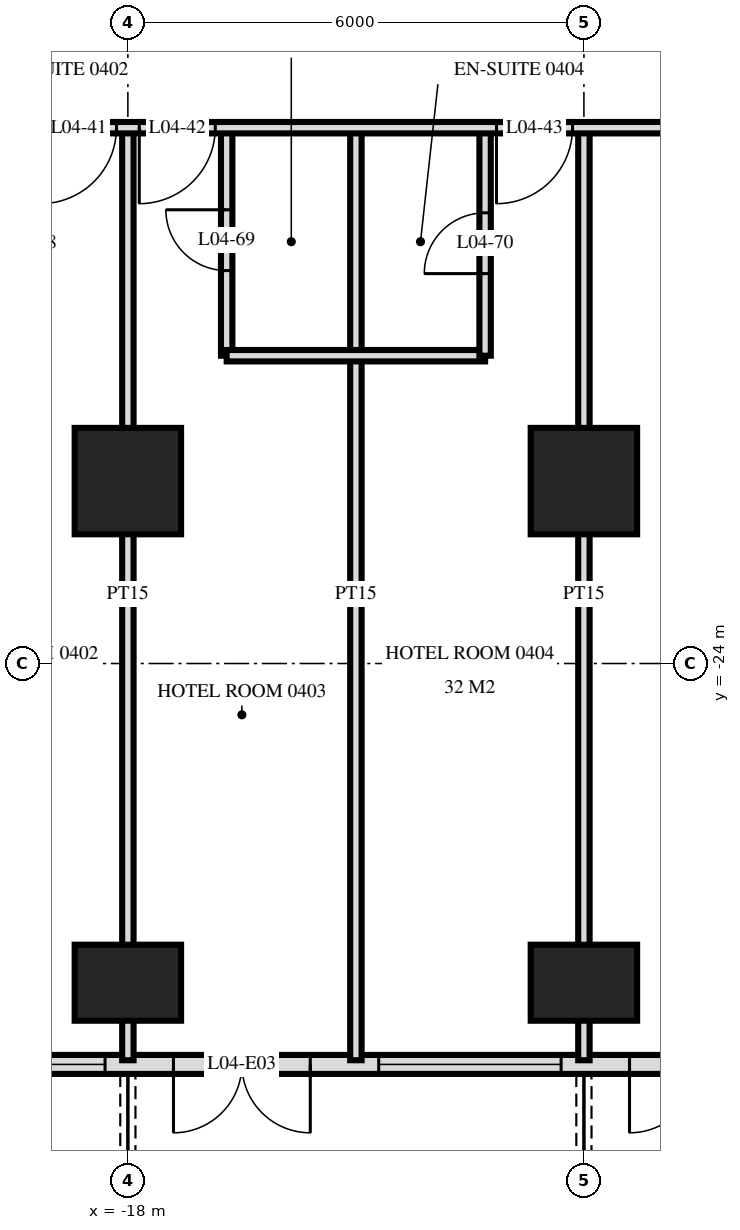
"""IFC4 building model, lengths in metres.
Left out: names, types, materials, properties, quantities, classifications, styles, units other than length and angle.
Written with IfcOpenShell. Run it as: python <this file> out.ifc"""

import sys

from ifc_helpers import new_model, si_unit, direction, frame, frame_2d, origin, origin_2d, place, context, subcontext, project, spatial, rectangle, extrude, element, fill, save


model = new_model("IFC4")
c1 = context("Model", 3, precision=1e-05, world=origin(), true_north=direction((0.0, 1.0)))
c2 = subcontext(c1, "Body", "Model", "MODEL_VIEW")
j1 = project(units=[si_unit("LENGTHUNIT", "METRE"), si_unit("PLANEANGLEUNIT", "RADIAN")], contexts=[c1])
p1 = place(None, origin())
s1 = spatial("IfcSite", under=j1, at=p1, CompositionType="ELEMENT")
p2 = place(p1, origin())
s2 = spatial("IfcBuilding", under=s1, at=p2, CompositionType="ELEMENT")
p3 = place(p2, frame((0.0, 0.0, 24.0)))
s3 = spatial("IfcBuildingStorey", under=s2, at=p3, CompositionType="ELEMENT", Elevation=24.0)
p4 = place(p3, frame((-18.0, -28.2, -0.28), z_axis=(0.0, 0.0, 1.0), x_axis=(1.0, 0.0, 0.0)))
e1 = element("IfcColumn", 1, at=p4, inside=s3, PredefinedType="COLUMN", context=c2, shape_type="SweptSolid", body=[
    extrude(rectangle(XDim=1.4, YDim=1.0, at=origin_2d()), origin(), (0.0, 0.0, 1.0), 3.88),
])
p5 = place(p3, frame((-18.0, -21.6, -0.28), z_axis=(0.0, 0.0, 1.0), x_axis=(1.0, 0.0, 0.0)))
e2 = element("IfcColumn", 2, at=p5, inside=s3, PredefinedType="COLUMN", context=c2, shape_type="SweptSolid", body=[
    extrude(rectangle(XDim=1.4, YDim=1.4, at=origin_2d()), origin(), (0.0, 0.0, 1.0), 3.88),
])
p6 = place(p3, frame((-12.0, -28.2, -0.28), z_axis=(0.0, 0.0, 1.0), x_axis=(1.0, 0.0, 0.0)))
e3 = element("IfcColumn", 3, at=p6, inside=s3, PredefinedType="COLUMN", context=c2, shape_type="SweptSolid", body=[
    extrude(rectangle(XDim=1.4, YDim=1.0, at=origin_2d()), origin(), (0.0, 0.0, 1.0), 3.88),
])
p7 = place(p3, frame((-12.0, -21.6, -0.28), z_axis=(0.0, 0.0, 1.0), x_axis=(1.0, 0.0, 0.0)))
e4 = element("IfcColumn", 4, at=p7, inside=s3, PredefinedType="COLUMN", context=c2, shape_type="SweptSolid", body=[
    extrude(rectangle(XDim=1.4, YDim=1.4, at=origin_2d()), origin(), (0.0, 0.0, 1.0), 3.88),
])
p8 = place(p3, frame((-28.775, -29.275, 0.0), z_axis=(0.0, 0.0, 1.0), x_axis=(1.0, 0.0, 0.0)))
e5 = element("IfcWall", 5, at=p8, inside=s3, PredefinedType="SOLIDWALL", context=c2, shape_type="SweptSolid", body=[
    extrude(rectangle(XDim=57.551, YDim=0.25, at=frame_2d((28.775, 0.0))), origin(), (0.0, 0.0, 1.0), 3.32),
])
p9 = place(p8, frame((0.575, 0.0, 0.0)))
e6 = element("IfcOpeningElement", 6, at=p9, cuts=e5, PredefinedType="OPENING", context=c2, shape_type="SweptSolid", body=[
    extrude(rectangle(XDim=1.8, YDim=2.4, at=frame_2d((0.9, 1.2))), frame((0.0, 0.135, 0.0), z_axis=(0.0, -1.0, 0.0), x_axis=(1.0, 0.0, 0.0)), (0.0, 0.0, 1.0), 0.27),
])
p10 = place(p8, frame((5.375, 0.0, 0.0)))
e7 = element("IfcOpeningElement", 7, at=p10, cuts=e5, PredefinedType="OPENING", context=c2, shape_type="SweptSolid", body=[
    extrude(rectangle(XDim=1.8, YDim=2.4, at=frame_2d((0.9, 1.2))), frame((0.0, 0.135, 0.0), z_axis=(0.0, -1.0, 0.0), x_axis=(1.0, 0.0, 0.0)), (0.0, 0.0, 1.0), 0.27),
])
p11 = place(p8, frame((8.075, 0.0, 0.3)))
e8 = element("IfcOpeningElement", 8, at=p11, cuts=e5, PredefinedType="OPENING", context=c2, shape_type="SweptSolid", body=[
    extrude(rectangle(XDim=2.4, YDim=2.1, at=frame_2d((1.2, 1.05))), frame((0.0, 0.135, 0.0), z_axis=(0.0, -1.0, 0.0), x_axis=(1.0, 0.0, 0.0)), (0.0, 0.0, 1.0), 0.27),
])
p12 = place(p8, frame((11.375, 0.0, 0.0)))
e9 = element("IfcOpeningElement", 9, at=p12, cuts=e5, PredefinedType="OPENING", context=c2, shape_type="SweptSolid", body=[
    extrude(rectangle(XDim=1.8, YDim=2.4, at=frame_2d((0.9, 1.2))), frame((0.0, 0.135, 0.0), z_axis=(0.0, -1.0, 0.0), x_axis=(1.0, 0.0, 0.0)), (0.0, 0.0, 1.0), 0.27),
])
p13 = place(p8, frame((14.075, 0.0, 0.3)))
e10 = element("IfcOpeningElement", 10, at=p13, cuts=e5, PredefinedType="OPENING", context=c2, shape_type="SweptSolid", body=[
    extrude(rectangle(XDim=2.4, YDim=2.1, at=frame_2d((1.2, 1.05))), frame((0.0, 0.135, 0.0), z_axis=(0.0, -1.0, 0.0), x_axis=(1.0, 0.0, 0.0)), (0.0, 0.0, 1.0), 0.27),
])
p14 = place(p8, frame((17.375, 0.0, 0.0)))
e11 = element("IfcOpeningElement", 11, at=p14, cuts=e5, PredefinedType="OPENING", context=c2, shape_type="SweptSolid", body=[
    extrude(rectangle(XDim=1.8, YDim=2.4, at=frame_2d((0.9, 1.2))), frame((0.0, 0.135, 0.0), z_axis=(0.0, -1.0, 0.0), x_axis=(1.0, 0.0, 0.0)), (0.0, 0.0, 1.0), 0.27),
])
p15 = place(p8, frame((20.075, 0.0, 0.3)))
e12 = element("IfcOpeningElement", 12, at=p15, cuts=e5, PredefinedType="OPENING", context=c2, shape_type="SweptSolid", body=[
    extrude(rectangle(XDim=2.4, YDim=2.1, at=frame_2d((1.2, 1.05))), frame((0.0, 0.135, 0.0), z_axis=(0.0, -1.0, 0.0), x_axis=(1.0, 0.0, 0.0)), (0.0, 0.0, 1.0), 0.27),
])
p16 = place(p8, frame((23.075, 0.0, 0.3)))
e13 = element("IfcOpeningElement", 13, at=p16, cuts=e5, PredefinedType="OPENING", context=c2, shape_type="SweptSolid", body=[
    extrude(rectangle(XDim=2.4, YDim=2.1, at=frame_2d((1.2, 1.05))), frame((0.0, 0.135, 0.0), z_axis=(0.0, -1.0, 0.0), x_axis=(1.0, 0.0, 0.0)), (0.0, 0.0, 1.0), 0.27),
])
p17 = place(p8, frame((26.375, 0.0, 0.0)))
e14 = element("IfcOpeningElement", 14, at=p17, cuts=e5, PredefinedType="OPENING", context=c2, shape_type="SweptSolid", body=[
    extrude(rectangle(XDim=1.8, YDim=2.4, at=frame_2d((0.9, 1.2))), frame((0.0, 0.135, 0.0), z_axis=(0.0, -1.0, 0.0), x_axis=(1.0, 0.0, 0.0)), (0.0, 0.0, 1.0), 0.27),
])
p18 = place(p8, frame((29.375, 0.0, 0.0)))
e15 = element("IfcOpeningElement", 15, at=p18, cuts=e5, PredefinedType="OPENING", context=c2, shape_type="SweptSolid", body=[
    extrude(rectangle(XDim=1.8, YDim=2.4, at=frame_2d((0.9, 1.2))), frame((0.0, 0.135, 0.0), z_axis=(0.0, -1.0, 0.0), x_axis=(1.0, 0.0, 0.0)), (0.0, 0.0, 1.0), 0.27),
])
p19 = place(p8, frame((32.075, 0.0, 0.3)))
e16 = element("IfcOpeningElement", 16, at=p19, cuts=e5, PredefinedType="OPENING", context=c2, shape_type="SweptSolid", body=[
    extrude(rectangle(XDim=2.4, YDim=2.1, at=frame_2d((1.2, 1.05))), frame((0.0, 0.135, 0.0), z_axis=(0.0, -1.0, 0.0), x_axis=(1.0, 0.0, 0.0)), (0.0, 0.0, 1.0), 0.27),
])
p20 = place(p8, frame((35.375, 0.0, 0.0)))
e17 = element("IfcOpeningElement", 17, at=p20, cuts=e5, PredefinedType="OPENING", context=c2, shape_type="SweptSolid", body=[
    extrude(rectangle(XDim=1.8, YDim=2.4, at=frame_2d((0.9, 1.2))), frame((0.0, 0.135, 0.0), z_axis=(0.0, -1.0, 0.0), x_axis=(1.0, 0.0, 0.0)), (0.0, 0.0, 1.0), 0.27),
])
p21 = place(p8, frame((38.075, 0.0, 0.3)))
e18 = element("IfcOpeningElement", 18, at=p21, cuts=e5, PredefinedType="OPENING", context=c2, shape_type="SweptSolid", body=[
    extrude(rectangle(XDim=2.4, YDim=2.1, at=frame_2d((1.2, 1.05))), frame((0.0, 0.135, 0.0), z_axis=(0.0, -1.0, 0.0), x_axis=(1.0, 0.0, 0.0)), (0.0, 0.0, 1.0), 0.27),
])
p22 = place(p8, frame((41.375, 0.0, 0.0)))
e19 = element("IfcOpeningElement", 19, at=p22, cuts=e5, PredefinedType="OPENING", context=c2, shape_type="SweptSolid", body=[
    extrude(rectangle(XDim=1.8, YDim=2.4, at=frame_2d((0.9, 1.2))), frame((0.0, 0.135, 0.0), z_axis=(0.0, -1.0, 0.0), x_axis=(1.0, 0.0, 0.0)), (0.0, 0.0, 1.0), 0.27),
])
p23 = place(p8, frame((44.075, 0.0, 0.3)))
e20 = element("IfcOpeningElement", 20, at=p23, cuts=e5, PredefinedType="OPENING", context=c2, shape_type="SweptSolid", body=[
    extrude(rectangle(XDim=2.4, YDim=2.1, at=frame_2d((1.2, 1.05))), frame((0.0, 0.135, 0.0), z_axis=(0.0, -1.0, 0.0), x_axis=(1.0, 0.0, 0.0)), (0.0, 0.0, 1.0), 0.27),
])
p24 = place(p8, frame((47.075, 0.0, 0.3)))
e21 = element("IfcOpeningElement", 21, at=p24, cuts=e5, PredefinedType="OPENING", context=c2, shape_type="SweptSolid", body=[
    extrude(rectangle(XDim=2.4, YDim=2.1, at=frame_2d((1.2, 1.05))), frame((0.0, 0.135, 0.0), z_axis=(0.0, -1.0, 0.0), x_axis=(1.0, 0.0, 0.0)), (0.0, 0.0, 1.0), 0.27),
])
p25 = place(p8, frame((50.375, 0.0, 0.0)))
e22 = element("IfcOpeningElement", 22, at=p25, cuts=e5, PredefinedType="OPENING", context=c2, shape_type="SweptSolid", body=[
    extrude(rectangle(XDim=1.8, YDim=2.4, at=frame_2d((0.9, 1.2))), frame((0.0, 0.135, 0.0), z_axis=(0.0, -1.0, 0.0), x_axis=(1.0, 0.0, 0.0)), (0.0, 0.0, 1.0), 0.27),
])
p26 = place(p8, frame((53.375, 0.0, 0.0)))
e23 = element("IfcOpeningElement", 23, at=p26, cuts=e5, PredefinedType="OPENING", context=c2, shape_type="SweptSolid", body=[
    extrude(rectangle(XDim=1.8, YDim=2.4, at=frame_2d((0.9, 1.2))), frame((0.0, 0.135, 0.0), z_axis=(0.0, -1.0, 0.0), x_axis=(1.0, 0.0, 0.0)), (0.0, 0.0, 1.0), 0.27),
])
p27 = place(p3, frame((-12.0, -29.22, 0.0), z_axis=(0.0, 0.0, 1.0), x_axis=(0.0, 1.0, 0.0)))
e24 = element("IfcWall", 24, at=p27, inside=s3, PredefinedType="PARTITIONING", context=c2, shape_type="SweptSolid", body=[
    extrude(rectangle(XDim=12.27, YDim=0.15, at=frame_2d((6.135, 0.0))), origin(), (0.0, 0.0, 1.0), 3.32),
])
p28 = place(p3, frame((-13.3, -19.95, 0.0), z_axis=(0.0, 0.0, 1.0), x_axis=(0.0, 1.0, 0.0)))
e25 = element("IfcWall", 25, at=p28, inside=s3, PredefinedType="PARTITIONING", context=c2, shape_type="SweptSolid", body=[
    extrude(rectangle(XDim=3.0, YDim=0.15, at=frame_2d((1.5, 0.0))), origin(), (0.0, 0.0, 1.0), 3.32),
])
p29 = place(p28, frame((1.08, 0.0, 0.0)))
e26 = element("IfcOpeningElement", 26, at=p29, cuts=e25, PredefinedType="OPENING", context=c2, shape_type="SweptSolid", body=[
    extrude(rectangle(XDim=0.8, YDim=2.1, at=frame_2d((0.4, 1.05))), frame((0.0, 0.085, 0.0), z_axis=(0.0, -1.0, 0.0), x_axis=(1.0, 0.0, 0.0)), (0.0, 0.0, 1.0), 0.17),
])
p30 = place(p3, frame((-15.0, -29.22, 0.0), z_axis=(0.0, 0.0, 1.0), x_axis=(0.0, 1.0, 0.0)))
e27 = element("IfcWall", 27, at=p30, inside=s3, PredefinedType="PARTITIONING", context=c2, shape_type="SweptSolid", body=[
    extrude(rectangle(XDim=12.27, YDim=0.15, at=frame_2d((6.135, 0.0))), origin(), (0.0, 0.0, 1.0), 3.32),
])
p31 = place(p3, frame((-16.7, -19.95, 0.0), z_axis=(0.0, 0.0, 1.0), x_axis=(0.0, 1.0, 0.0)))
e28 = element("IfcWall", 28, at=p31, inside=s3, PredefinedType="PARTITIONING", context=c2, shape_type="SweptSolid", body=[
    extrude(rectangle(XDim=3.0, YDim=0.15, at=frame_2d((1.5, 0.0))), origin(), (0.0, 0.0, 1.0), 3.32),
])
p32 = place(p31, frame((1.12, 0.0, 0.0)))
e29 = element("IfcOpeningElement", 29, at=p32, cuts=e28, PredefinedType="OPENING", context=c2, shape_type="SweptSolid", body=[
    extrude(rectangle(XDim=0.8, YDim=2.1, at=frame_2d((0.4, 1.05))), frame((0.0, 0.085, 0.0), z_axis=(0.0, -1.0, 0.0), x_axis=(1.0, 0.0, 0.0)), (0.0, 0.0, 1.0), 0.17),
])
p33 = place(p3, frame((-18.0, -29.22, 0.0), z_axis=(0.0, 0.0, 1.0), x_axis=(0.0, 1.0, 0.0)))
e30 = element("IfcWall", 30, at=p33, inside=s3, PredefinedType="PARTITIONING", context=c2, shape_type="SweptSolid", body=[
    extrude(rectangle(XDim=12.27, YDim=0.15, at=frame_2d((6.135, 0.0))), origin(), (0.0, 0.0, 1.0), 3.32),
])
p34 = place(p3, frame((-16.7, -19.95, 0.0), z_axis=(0.0, 0.0, 1.0), x_axis=(1.0, 0.0, 0.0)))
e31 = element("IfcWall", 31, at=p34, inside=s3, PredefinedType="PARTITIONING", context=c2, shape_type="SweptSolid", body=[
    extrude(rectangle(XDim=3.4, YDim=0.15, at=frame_2d((1.7, 0.0))), origin(), (0.0, 0.0, 1.0), 3.32),
])
p35 = place(p3, frame((-33.12, -16.95, 0.0), z_axis=(0.0, 0.0, 1.0), x_axis=(1.0, 0.0, 0.0)))
e32 = element("IfcWall", 32, at=p35, inside=s3, PredefinedType="PARTITIONING", context=c2, shape_type="SweptSolid", body=[
    extrude(rectangle(XDim=66.24, YDim=0.15, at=frame_2d((33.12, 0.0))), origin(), (0.0, 0.0, 1.0), 3.32),
])
p36 = place(p35, frame((9.27, 0.0, 0.0)))
e33 = element("IfcOpeningElement", 33, at=p36, cuts=e32, PredefinedType="OPENING", context=c2, shape_type="SweptSolid", body=[
    extrude(rectangle(XDim=1.0, YDim=2.1, at=frame_2d((0.5, 1.05))), frame((0.0, 0.085, 0.0), z_axis=(0.0, -1.0, 0.0), x_axis=(1.0, 0.0, 0.0)), (0.0, 0.0, 1.0), 0.17),
])
p37 = place(p35, frame((13.97, 0.0, 0.0)))
e34 = element("IfcOpeningElement", 34, at=p37, cuts=e32, PredefinedType="OPENING", context=c2, shape_type="SweptSolid", body=[
    extrude(rectangle(XDim=1.0, YDim=2.1, at=frame_2d((0.5, 1.05))), frame((0.0, 0.085, 0.0), z_axis=(0.0, -1.0, 0.0), x_axis=(1.0, 0.0, 0.0)), (0.0, 0.0, 1.0), 0.17),
])
p38 = place(p35, frame((15.27, 0.0, 0.0)))
e35 = element("IfcOpeningElement", 35, at=p38, cuts=e32, PredefinedType="OPENING", context=c2, shape_type="SweptSolid", body=[
    extrude(rectangle(XDim=1.0, YDim=2.1, at=frame_2d((0.5, 1.05))), frame((0.0, 0.085, 0.0), z_axis=(0.0, -1.0, 0.0), x_axis=(1.0, 0.0, 0.0)), (0.0, 0.0, 1.0), 0.17),
])
p39 = place(p35, frame((19.97, 0.0, 0.0)))
e36 = element("IfcOpeningElement", 36, at=p39, cuts=e32, PredefinedType="OPENING", context=c2, shape_type="SweptSolid", body=[
    extrude(rectangle(XDim=1.0, YDim=2.1, at=frame_2d((0.5, 1.05))), frame((0.0, 0.085, 0.0), z_axis=(0.0, -1.0, 0.0), x_axis=(1.0, 0.0, 0.0)), (0.0, 0.0, 1.0), 0.17),
])
p40 = place(p35, frame((22.27, 0.0, 0.0)))
e37 = element("IfcOpeningElement", 37, at=p40, cuts=e32, PredefinedType="OPENING", context=c2, shape_type="SweptSolid", body=[
    extrude(rectangle(XDim=1.0, YDim=2.1, at=frame_2d((0.5, 1.05))), frame((0.0, 0.085, 0.0), z_axis=(0.0, -1.0, 0.0), x_axis=(1.0, 0.0, 0.0)), (0.0, 0.0, 1.0), 0.17),
])
p41 = place(p35, frame((28.97, 0.0, 0.0)))
e38 = element("IfcOpeningElement", 38, at=p41, cuts=e32, PredefinedType="OPENING", context=c2, shape_type="SweptSolid", body=[
    extrude(rectangle(XDim=1.0, YDim=2.1, at=frame_2d((0.5, 1.05))), frame((0.0, 0.085, 0.0), z_axis=(0.0, -1.0, 0.0), x_axis=(1.0, 0.0, 0.0)), (0.0, 0.0, 1.0), 0.17),
])
p42 = place(p35, frame((30.27, 0.0, 0.0)))
e39 = element("IfcOpeningElement", 39, at=p42, cuts=e32, PredefinedType="OPENING", context=c2, shape_type="SweptSolid", body=[
    extrude(rectangle(XDim=1.0, YDim=2.1, at=frame_2d((0.5, 1.05))), frame((0.0, 0.085, 0.0), z_axis=(0.0, -1.0, 0.0), x_axis=(1.0, 0.0, 0.0)), (0.0, 0.0, 1.0), 0.17),
])
p43 = place(p35, frame((34.97, 0.0, 0.0)))
e40 = element("IfcOpeningElement", 40, at=p43, cuts=e32, PredefinedType="OPENING", context=c2, shape_type="SweptSolid", body=[
    extrude(rectangle(XDim=1.0, YDim=2.1, at=frame_2d((0.5, 1.05))), frame((0.0, 0.085, 0.0), z_axis=(0.0, -1.0, 0.0), x_axis=(1.0, 0.0, 0.0)), (0.0, 0.0, 1.0), 0.17),
])
p44 = place(p35, frame((36.27, 0.0, 0.0)))
e41 = element("IfcOpeningElement", 41, at=p44, cuts=e32, PredefinedType="OPENING", context=c2, shape_type="SweptSolid", body=[
    extrude(rectangle(XDim=1.0, YDim=2.1, at=frame_2d((0.5, 1.05))), frame((0.0, 0.085, 0.0), z_axis=(0.0, -1.0, 0.0), x_axis=(1.0, 0.0, 0.0)), (0.0, 0.0, 1.0), 0.17),
])
p45 = place(p35, frame((40.97, 0.0, 0.0)))
e42 = element("IfcOpeningElement", 42, at=p45, cuts=e32, PredefinedType="OPENING", context=c2, shape_type="SweptSolid", body=[
    extrude(rectangle(XDim=1.0, YDim=2.1, at=frame_2d((0.5, 1.05))), frame((0.0, 0.085, 0.0), z_axis=(0.0, -1.0, 0.0), x_axis=(1.0, 0.0, 0.0)), (0.0, 0.0, 1.0), 0.17),
])
p46 = place(p35, frame((42.27, 0.0, 0.0)))
e43 = element("IfcOpeningElement", 43, at=p46, cuts=e32, PredefinedType="OPENING", context=c2, shape_type="SweptSolid", body=[
    extrude(rectangle(XDim=1.0, YDim=2.1, at=frame_2d((0.5, 1.05))), frame((0.0, 0.085, 0.0), z_axis=(0.0, -1.0, 0.0), x_axis=(1.0, 0.0, 0.0)), (0.0, 0.0, 1.0), 0.17),
])
p47 = place(p35, frame((46.97, 0.0, 0.0)))
e44 = element("IfcOpeningElement", 44, at=p47, cuts=e32, PredefinedType="OPENING", context=c2, shape_type="SweptSolid", body=[
    extrude(rectangle(XDim=1.0, YDim=2.1, at=frame_2d((0.5, 1.05))), frame((0.0, 0.085, 0.0), z_axis=(0.0, -1.0, 0.0), x_axis=(1.0, 0.0, 0.0)), (0.0, 0.0, 1.0), 0.17),
])
p48 = place(p35, frame((48.27, 0.0, 0.0)))
e45 = element("IfcOpeningElement", 45, at=p48, cuts=e32, PredefinedType="OPENING", context=c2, shape_type="SweptSolid", body=[
    extrude(rectangle(XDim=1.0, YDim=2.1, at=frame_2d((0.5, 1.05))), frame((0.0, 0.085, 0.0), z_axis=(0.0, -1.0, 0.0), x_axis=(1.0, 0.0, 0.0)), (0.0, 0.0, 1.0), 0.17),
])
p49 = place(p35, frame((52.97, 0.0, 0.0)))
e46 = element("IfcOpeningElement", 46, at=p49, cuts=e32, PredefinedType="OPENING", context=c2, shape_type="SweptSolid", body=[
    extrude(rectangle(XDim=1.0, YDim=2.1, at=frame_2d((0.5, 1.05))), frame((0.0, 0.085, 0.0), z_axis=(0.0, -1.0, 0.0), x_axis=(1.0, 0.0, 0.0)), (0.0, 0.0, 1.0), 0.17),
])
p50 = place(p35, frame((54.27, 0.0, 0.0)))
e47 = element("IfcOpeningElement", 47, at=p50, cuts=e32, PredefinedType="OPENING", context=c2, shape_type="SweptSolid", body=[
    extrude(rectangle(XDim=1.0, YDim=2.1, at=frame_2d((0.5, 1.05))), frame((0.0, 0.085, 0.0), z_axis=(0.0, -1.0, 0.0), x_axis=(1.0, 0.0, 0.0)), (0.0, 0.0, 1.0), 0.17),
])
p51 = place(p35, frame((4.4, 0.0, 0.0)))
e48 = element("IfcOpeningElement", 48, at=p51, cuts=e32, PredefinedType="OPENING", context=c2, shape_type="SweptSolid", body=[
    extrude(rectangle(XDim=1.0, YDim=2.1, at=frame_2d((0.5, 1.05))), frame((0.0, 0.085, 0.0), z_axis=(0.0, -1.0, 0.0), x_axis=(1.0, 0.0, 0.0)), (0.0, 0.0, 1.0), 0.17),
])
p52 = place(p35, frame((60.8, 0.0, 0.0)))
e49 = element("IfcOpeningElement", 49, at=p52, cuts=e32, PredefinedType="OPENING", context=c2, shape_type="SweptSolid", body=[
    extrude(rectangle(XDim=1.0, YDim=2.1, at=frame_2d((0.5, 1.05))), frame((0.0, 0.085, 0.0), z_axis=(0.0, -1.0, 0.0), x_axis=(1.0, 0.0, 0.0)), (0.0, 0.0, 1.0), 0.17),
])
p53 = place(p11, origin())
e50 = element("IfcWindow", 50, at=p53, inside=s3, PartitioningType="SINGLE_PANEL", PredefinedType="WINDOW", context=c2, shape_type="SweptSolid", body=[
    extrude(rectangle(XDim=2.4, YDim=2.1, at=frame_2d((1.2, 1.05))), frame((0.0, 0.03, 0.0), z_axis=(0.0, -1.0, 0.0), x_axis=(1.0, 0.0, 0.0)), (0.0, 0.0, 1.0), 0.06),
])
fill(e8, e50)
p54 = place(p12, frame((0.9, 0.0, 0.0), z_axis=(0.0, 0.0, 1.0), x_axis=(-1.0, 0.0, 0.0)))
e51 = element("IfcDoor", 51, at=p54, inside=s3, OperationType="DOUBLE_DOOR_SINGLE_SWING", PredefinedType="DOOR", context=c2, shape_type="SweptSolid", body=[
    extrude(rectangle(XDim=1.8, YDim=2.4, at=frame_2d((0.0, 1.2))), frame((0.0, -0.025, 0.0), z_axis=(0.0, 1.0, 0.0), x_axis=(-1.0, 0.0, 0.0)), (0.0, 0.0, 1.0), 0.05),
])
fill(e9, e51)
p55 = place(p13, origin())
e52 = element("IfcWindow", 52, at=p55, inside=s3, PartitioningType="SINGLE_PANEL", PredefinedType="WINDOW", context=c2, shape_type="SweptSolid", body=[
    extrude(rectangle(XDim=2.4, YDim=2.1, at=frame_2d((1.2, 1.05))), frame((0.0, 0.03, 0.0), z_axis=(0.0, -1.0, 0.0), x_axis=(1.0, 0.0, 0.0)), (0.0, 0.0, 1.0), 0.06),
])
fill(e10, e52)
p56 = place(p14, frame((0.9, 0.0, 0.0), z_axis=(0.0, 0.0, 1.0), x_axis=(-1.0, 0.0, 0.0)))
e53 = element("IfcDoor", 53, at=p56, inside=s3, OperationType="DOUBLE_DOOR_SINGLE_SWING", PredefinedType="DOOR", context=c2, shape_type="SweptSolid", body=[
    extrude(rectangle(XDim=1.8, YDim=2.4, at=frame_2d((0.0, 1.2))), frame((0.0, -0.025, 0.0), z_axis=(0.0, 1.0, 0.0), x_axis=(-1.0, 0.0, 0.0)), (0.0, 0.0, 1.0), 0.05),
])
fill(e11, e53)
p57 = place(p37, frame((0.5, 0.0, 0.0), z_axis=(0.0, 0.0, 1.0), x_axis=(-1.0, 0.0, 0.0)))
e54 = element("IfcDoor", 54, at=p57, inside=s3, OperationType="SINGLE_SWING_LEFT", PredefinedType="DOOR", context=c2, shape_type="SweptSolid", body=[
    extrude(rectangle(XDim=1.0, YDim=2.1, at=frame_2d((0.0, 1.05))), frame((0.0, -0.025, 0.0), z_axis=(0.0, 1.0, 0.0), x_axis=(-1.0, 0.0, 0.0)), (0.0, 0.0, 1.0), 0.05),
])
fill(e34, e54)
p58 = place(p38, frame((0.5, 0.0, 0.0), z_axis=(0.0, 0.0, 1.0), x_axis=(-1.0, 0.0, 0.0)))
e55 = element("IfcDoor", 55, at=p58, inside=s3, OperationType="SINGLE_SWING_LEFT", PredefinedType="DOOR", context=c2, shape_type="SweptSolid", body=[
    extrude(rectangle(XDim=1.0, YDim=2.1, at=frame_2d((0.0, 1.05))), frame((0.0, -0.025, 0.0), z_axis=(0.0, 1.0, 0.0), x_axis=(-1.0, 0.0, 0.0)), (0.0, 0.0, 1.0), 0.05),
])
fill(e35, e55)
p59 = place(p39, frame((0.5, 0.0, 0.0), z_axis=(0.0, 0.0, 1.0), x_axis=(-1.0, 0.0, 0.0)))
e56 = element("IfcDoor", 56, at=p59, inside=s3, OperationType="SINGLE_SWING_LEFT", PredefinedType="DOOR", context=c2, shape_type="SweptSolid", body=[
    extrude(rectangle(XDim=1.0, YDim=2.1, at=frame_2d((0.0, 1.05))), frame((0.0, -0.025, 0.0), z_axis=(0.0, 1.0, 0.0), x_axis=(-1.0, 0.0, 0.0)), (0.0, 0.0, 1.0), 0.05),
])
fill(e36, e56)
p60 = place(p32, origin())
e57 = element("IfcDoor", 57, at=p60, inside=s3, OperationType="SINGLE_SWING_LEFT", PredefinedType="DOOR", context=c2, shape_type="SweptSolid", body=[
    extrude(rectangle(XDim=0.8, YDim=2.1, at=frame_2d((0.4, 1.05))), frame((0.0, 0.025, 0.0), z_axis=(0.0, -1.0, 0.0), x_axis=(1.0, 0.0, 0.0)), (0.0, 0.0, 1.0), 0.05),
])
fill(e29, e57)
p61 = place(p29, origin())
e58 = element("IfcDoor", 58, at=p61, inside=s3, OperationType="SINGLE_SWING_RIGHT", PredefinedType="DOOR", context=c2, shape_type="SweptSolid", body=[
    extrude(rectangle(XDim=0.8, YDim=2.1, at=frame_2d((0.4, 1.05))), frame((0.0, 0.025, 0.0), z_axis=(0.0, -1.0, 0.0), x_axis=(1.0, 0.0, 0.0)), (0.0, 0.0, 1.0), 0.05),
])
fill(e26, e58)
save(model, sys.argv[1])
